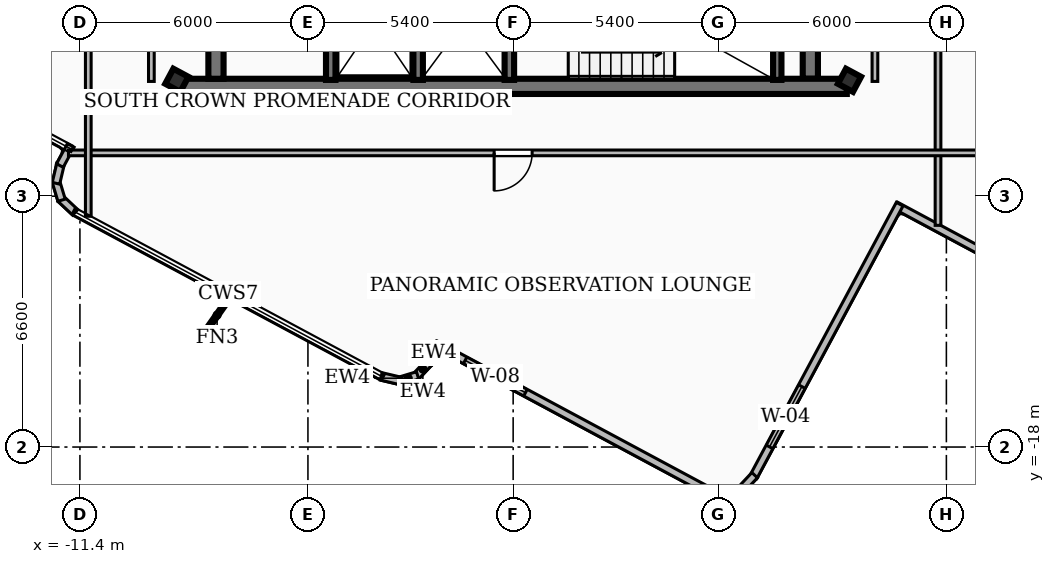
"""IFC4 building model, lengths in metres.
Left out: names, types, materials, properties, quantities, classifications, styles, units other than length and angle.
Written with IfcOpenShell. Run it as: python <this file> out.ifc"""

import sys

from ifc_helpers import new_model, si_unit, direction, frame, frame_2d, origin, origin_2d, place, context, subcontext, project, spatial, rectangle, hollow_rectangle, extrude, element, fill, save


model = new_model("IFC4")
c1 = context("Model", 3, precision=1e-05, world=origin(), true_north=direction((0.0, 1.0)))
c2 = subcontext(c1, "Body", "Model", "MODEL_VIEW")
j1 = project(units=[si_unit("LENGTHUNIT", "METRE"), si_unit("PLANEANGLEUNIT", "RADIAN")], contexts=[c1])
p1 = place(None, origin())
s1 = spatial("IfcSite", under=j1, at=p1, CompositionType="ELEMENT")
p2 = place(p1, origin())
s2 = spatial("IfcBuilding", under=s1, at=p2, CompositionType="ELEMENT")
p3 = place(p2, frame((0.0, 0.0, 285.12)))
s3 = spatial("IfcBuildingStorey", under=s2, at=p3, CompositionType="ELEMENT", Elevation=285.12)
p4 = place(p3, frame((8.78, -8.51, 0.0), z_axis=(0.0, 0.0, 1.0), x_axis=(-1.0, 0.0, 0.0)))
e1 = element("IfcWall", 1, at=p4, inside=s3, PredefinedType="SHEAR", context=c2, shape_type="SweptSolid", body=[
    extrude(rectangle(XDim=17.56, YDim=0.4, at=frame_2d((8.78, 0.0))), origin(), (0.0, 0.0, 1.0), 3.84),
])
for number, where, z_axis, x_axis in (
    (2, (-7.82, -8.31, 0.0), (0.0, 0.0, 1.0), (0.0, 1.0, 0.0)),
    (3, (7.82, -1.95, 0.0), (0.0, 0.0, 1.0), (0.0, -1.0, 0.0)),
):
    element("IfcWall", number, at=place(p3, frame(where, z_axis=z_axis, x_axis=x_axis)), inside=s3, PredefinedType="SHEAR", context=c2, shape_type="SweptSolid", body=[
        extrude(rectangle(XDim=6.36, YDim=0.4, at=frame_2d((3.18, 0.0))), origin(), (0.0, 0.0, 1.0), 3.84),
    ])
p5 = place(p3, frame((6.95, -8.34, 0.0), z_axis=(0.0, 0.0, 1.0), x_axis=(0.0, 1.0, 0.0)))
e4 = element("IfcWall", 4, at=p5, inside=s3, PredefinedType="SOLIDWALL", context=c2, shape_type="SweptSolid", body=[
    extrude(rectangle(XDim=3.06, YDim=0.22, at=frame_2d((1.53, 0.0))), origin(), (0.0, 0.0, 1.0), 3.84),
])
for number, where, z_axis, x_axis in (
    (5, (-0.1, -8.34, 0.0), (0.0, 0.0, 1.0), (0.0, 1.0, 0.0)),
    (6, (-2.5, -8.34, 0.0), (0.0, 0.0, 1.0), (0.0, 1.0, 0.0)),
    (7, (-4.8, -8.34, 0.0), (0.0, 0.0, 1.0), (0.0, 1.0, 0.0)),
):
    element("IfcWall", number, at=place(p3, frame(where, z_axis=z_axis, x_axis=x_axis)), inside=s3, PredefinedType="SOLIDWALL", context=c2, shape_type="SweptSolid", body=[
        extrude(rectangle(XDim=3.04, YDim=0.25, at=frame_2d((1.52, 0.0))), origin(), (0.0, 0.0, 1.0), 3.84),
    ])
for number, where, z_axis, x_axis in (
    (8, (8.85, -8.35, 0.0), (0.0, 0.0, 1.0), (0.473, 0.881, 0.0)),
    (9, (-8.85, -8.35, 0.0), (0.0, 0.0, 1.0), (0.473, 0.881, 0.0)),
):
    element("IfcColumn", number, at=place(p3, frame(where, z_axis=z_axis, x_axis=x_axis)), inside=s3, PredefinedType="COLUMN", context=c2, shape_type="SweptSolid", body=[
        extrude(hollow_rectangle(XDim=0.45, YDim=0.45, WallThickness=0.022, at=origin_2d()), origin(), (0.0, 0.0, 1.0), 4.14),
    ])
p6 = place(p3, frame((-1.938, -15.266, 0.0), z_axis=(0.0, 0.0, 1.0), x_axis=(-0.475211699331, -0.879871491082, 0.0)))
e10 = element("IfcWall", 10, at=p6, inside=s3, PredefinedType="SOLIDWALL", context=c2, shape_type="SweptSolid", body=[
    extrude(rectangle(XDim=0.602, YDim=0.2, at=frame_2d((0.301, 0.0))), origin(), (0.0, 0.0, 1.0), 3.84),
])
p7 = place(p3, frame((-2.195, -15.756, 0.0), z_axis=(0.0, 0.0, 1.0), x_axis=(-0.684988740216, -0.728553653328, 0.0)))
e11 = element("IfcWall", 11, at=p7, inside=s3, PredefinedType="SOLIDWALL", context=c2, shape_type="SweptSolid", body=[
    extrude(rectangle(XDim=0.527, YDim=0.2, at=frame_2d((0.263, 0.0))), origin(), (0.0, 0.0, 1.0), 3.84),
])
p8 = place(p3, frame((-2.515, -16.115, 0.0), z_axis=(0.0, 0.0, 1.0), x_axis=(-0.95766925037, -0.287870816332, 0.0)))
e12 = element("IfcWall", 12, at=p8, inside=s3, PredefinedType="SOLIDWALL", context=c2, shape_type="SweptSolid", body=[
    extrude(rectangle(XDim=0.514, YDim=0.2, at=frame_2d((0.257, 0.0))), origin(), (0.0, 0.0, 1.0), 3.84),
])
p9 = place(p3, frame((-2.959, -16.262, 0.0), z_axis=(0.0, 0.0, 1.0), x_axis=(-0.973350293123, 0.22932336749, 0.0)))
e13 = element("IfcWall", 13, at=p9, inside=s3, PredefinedType="SOLIDWALL", context=c2, shape_type="SweptSolid", body=[
    extrude(rectangle(XDim=0.527, YDim=0.2, at=frame_2d((0.264, 0.0))), origin(), (0.0, 0.0, 1.0), 3.84),
])
p10 = place(p3, frame((-11.523, -11.825, 0.0), z_axis=(0.0, 0.0, 1.0), x_axis=(-0.729638195887, 0.683833388409, 0.0)))
e14 = element("IfcWall", 14, at=p10, inside=s3, PredefinedType="SOLIDWALL", context=c2, shape_type="SweptSolid", body=[
    extrude(rectangle(XDim=0.528, YDim=0.2, at=frame_2d((0.264, 0.0))), origin(), (0.0, 0.0, 1.0), 3.84),
])
p11 = place(p3, frame((-11.883, -11.505, 0.0), z_axis=(0.0, 0.0, 1.0), x_axis=(-0.287478448092, 0.957787106763, 0.0)))
e15 = element("IfcWall", 15, at=p11, inside=s3, PredefinedType="SOLIDWALL", context=c2, shape_type="SweptSolid", body=[
    extrude(rectangle(XDim=0.515, YDim=0.2, at=frame_2d((0.257, 0.0))), origin(), (0.0, 0.0, 1.0), 3.84),
])
p12 = place(p3, frame((-12.03, -11.06, 0.0), z_axis=(0.0, 0.0, 1.0), x_axis=(0.229762213536, 0.973246795644, 0.0)))
e16 = element("IfcWall", 16, at=p12, inside=s3, PredefinedType="SOLIDWALL", context=c2, shape_type="SweptSolid", body=[
    extrude(rectangle(XDim=0.527, YDim=0.2, at=frame_2d((0.264, 0.0))), origin(), (0.0, 0.0, 1.0), 3.84),
])
p13 = place(p3, frame((-11.927, -10.593, 0.0), z_axis=(0.0, 0.0, 1.0), x_axis=(0.474728264628, 0.88013241888, 0.0)))
e17 = element("IfcWall", 17, at=p13, inside=s3, PredefinedType="SOLIDWALL", context=c2, shape_type="SweptSolid", body=[
    extrude(rectangle(XDim=0.602, YDim=0.2, at=frame_2d((0.301, 0.0))), origin(), (0.0, 0.0, 1.0), 3.84),
])
p14 = place(p3, frame((12.268, -12.825, 0.0), z_axis=(0.0, 0.0, 1.0), x_axis=(-0.881305917183, 0.472546167414, 0.0)))
e18 = element("IfcWall", 18, at=p14, inside=s3, PredefinedType="SOLIDWALL", context=c2, shape_type="SweptSolid", body=[
    extrude(rectangle(XDim=2.503, YDim=0.2, at=frame_2d((1.251, 0.0))), origin(), (0.0, 0.0, 1.0), 3.84),
])
p15 = place(p3, frame((10.171, -11.609, 0.0), z_axis=(0.0, 0.0, 1.0), x_axis=(-0.472535281242, -0.881311754138, 0.0)))
e19 = element("IfcWall", 19, at=p15, inside=s3, PredefinedType="SOLIDWALL", context=c2, shape_type="SweptSolid", body=[
    extrude(rectangle(XDim=8.137, YDim=0.2, at=frame_2d((4.068, 0.0))), origin(), (0.0, 0.0, 1.0), 3.84),
])
p16 = place(p15, frame((5.447, 0.0, 0.85)))
e20 = element("IfcOpeningElement", 20, at=p16, cuts=e19, PredefinedType="OPENING", context=c2, shape_type="SweptSolid", body=[
    extrude(rectangle(XDim=1.8, YDim=2.0, at=frame_2d((0.9, 1.0))), frame((0.0, 0.11, 0.0), z_axis=(0.0, -1.0, 0.0), x_axis=(1.0, 0.0, 0.0)), (0.0, 0.0, 1.0), 0.22),
])
p17 = place(p3, frame((6.355, -18.74, 0.0), z_axis=(0.0, 0.0, 1.0), x_axis=(-0.684079586619, -0.72940737532, 0.0)))
e21 = element("IfcWall", 21, at=p17, inside=s3, PredefinedType="SOLIDWALL", context=c2, shape_type="SweptSolid", body=[
    extrude(rectangle(XDim=0.528, YDim=0.2, at=frame_2d((0.264, 0.0))), origin(), (0.0, 0.0, 1.0), 3.84),
])
p18 = place(p3, frame((5.124, -19.144, 0.0), z_axis=(0.0, 0.0, 1.0), x_axis=(-0.881261771031, 0.472628491439, 0.0)))
e22 = element("IfcWall", 22, at=p18, inside=s3, PredefinedType="SOLIDWALL", context=c2, shape_type="SweptSolid", body=[
    extrude(rectangle(XDim=8.137, YDim=0.2, at=frame_2d((4.069, 0.0))), origin(), (0.0, 0.0, 1.0), 3.84),
])
p19 = place(p18, frame((5.447, 0.0, 0.85)))
e23 = element("IfcOpeningElement", 23, at=p19, cuts=e22, PredefinedType="OPENING", context=c2, shape_type="SweptSolid", body=[
    extrude(rectangle(XDim=1.8, YDim=1.8, at=frame_2d((0.9, 0.9))), frame((0.0, 0.11, 0.0), z_axis=(0.0, -1.0, 0.0), x_axis=(1.0, 0.0, 0.0)), (0.0, 0.0, 1.0), 0.22),
])
p20 = place(p3, frame((-9.52, -8.38, 0.0), z_axis=(0.0, 0.0, 1.0), x_axis=(0.0, 1.0, 0.0)))
e24 = element("IfcWall", 24, at=p20, inside=s3, PredefinedType="PARTITIONING", context=c2, shape_type="SweptSolid", body=[
    extrude(rectangle(XDim=6.63, YDim=0.15, at=frame_2d((3.315, 0.0))), origin(), (0.0, 0.0, 1.0), 3.84),
])
p21 = place(p3, frame((9.52, -8.38, 0.0), z_axis=(0.0, 0.0, 1.0), x_axis=(0.0, 1.0, 0.0)))
e25 = element("IfcWall", 25, at=p21, inside=s3, PredefinedType="PARTITIONING", context=c2, shape_type="SweptSolid", body=[
    extrude(rectangle(XDim=6.63, YDim=0.15, at=frame_2d((3.315, 0.0))), origin(), (0.0, 0.0, 1.0), 3.21),
])
p22 = place(p3, frame((11.18, 18.1, 0.0), z_axis=(0.0, 0.0, 1.0), x_axis=(0.0, -1.0, 0.0)))
e26 = element("IfcWall", 26, at=p22, inside=s3, PredefinedType="PARTITIONING", context=c2, shape_type="SweptSolid", body=[
    extrude(rectangle(XDim=30.267, YDim=0.15, at=frame_2d((15.134, 0.0))), origin(), (0.0, 0.0, 1.0), 3.84),
])
p23 = place(p22, frame((17.6, 0.0, 0.0)))
e27 = element("IfcOpeningElement", 27, at=p23, cuts=e26, PredefinedType="OPENING", context=c2, shape_type="SweptSolid", body=[
    extrude(rectangle(XDim=1.0, YDim=2.1, at=frame_2d((0.5, 1.05))), frame((0.0, 0.085, 0.0), z_axis=(0.0, -1.0, 0.0), x_axis=(1.0, 0.0, 0.0)), (0.0, 0.0, 1.0), 0.17),
])
p24 = place(p3, frame((-11.18, -11.928, 0.0), z_axis=(0.0, 0.0, 1.0), x_axis=(0.0, 1.0, 0.0)))
e28 = element("IfcWall", 28, at=p24, inside=s3, PredefinedType="PARTITIONING", context=c2, shape_type="SweptSolid", body=[
    extrude(rectangle(XDim=24.095, YDim=0.15, at=frame_2d((12.047, 0.0))), origin(), (0.0, 0.0, 1.0), 3.84),
])
p25 = place(p24, frame((9.828, 0.0, 0.0)))
e29 = element("IfcOpeningElement", 29, at=p25, cuts=e28, PredefinedType="OPENING", context=c2, shape_type="SweptSolid", body=[
    extrude(rectangle(XDim=1.0, YDim=2.1, at=frame_2d((0.5, 1.05))), frame((0.0, 0.085, 0.0), z_axis=(0.0, -1.0, 0.0), x_axis=(1.0, 0.0, 0.0)), (0.0, 0.0, 1.0), 0.17),
])
p26 = place(p3, frame((14.577, -10.26, 0.0), z_axis=(0.0, 0.0, 1.0), x_axis=(-1.0, 0.0, 0.0)))
e30 = element("IfcWall", 30, at=p26, inside=s3, PredefinedType="PARTITIONING", context=c2, shape_type="SweptSolid", body=[
    extrude(rectangle(XDim=26.278, YDim=0.15, at=frame_2d((13.139, 0.0))), origin(), (0.0, 0.0, 1.0), 3.84),
])
p27 = place(p26, frame((14.077, 0.0, 0.0)))
e31 = element("IfcOpeningElement", 31, at=p27, cuts=e30, PredefinedType="OPENING", context=c2, shape_type="SweptSolid", body=[
    extrude(rectangle(XDim=1.0, YDim=2.1, at=frame_2d((0.5, 1.05))), frame((0.0, 0.085, 0.0), z_axis=(0.0, -1.0, 0.0), x_axis=(1.0, 0.0, 0.0)), (0.0, 0.0, 1.0), 0.17),
])
p28 = place(p16, origin())
e32 = element("IfcWindow", 32, at=p28, inside=s3, PartitioningType="SINGLE_PANEL", PredefinedType="WINDOW", context=c2, shape_type="SweptSolid", body=[
    extrude(rectangle(XDim=1.8, YDim=2.0, at=frame_2d((0.9, 1.0))), frame((0.0, 0.03, 0.0), z_axis=(0.0, -1.0, 0.0), x_axis=(1.0, 0.0, 0.0)), (0.0, 0.0, 1.0), 0.06),
])
fill(e20, e32)
p29 = place(p19, origin())
e33 = element("IfcWindow", 33, at=p29, inside=s3, PartitioningType="SINGLE_PANEL", PredefinedType="WINDOW", context=c2, shape_type="SweptSolid", body=[
    extrude(rectangle(XDim=1.8, YDim=1.8, at=frame_2d((0.9, 0.9))), frame((0.0, 0.03, 0.0), z_axis=(0.0, -1.0, 0.0), x_axis=(1.0, 0.0, 0.0)), (0.0, 0.0, 1.0), 0.06),
])
fill(e23, e33)
p30 = place(p27, origin())
e34 = element("IfcDoor", 34, at=p30, inside=s3, OperationType="SINGLE_SWING_RIGHT", PredefinedType="DOOR", context=c2, shape_type="SweptSolid", body=[
    extrude(rectangle(XDim=1.0, YDim=2.1, at=frame_2d((0.5, 1.05))), frame((0.0, 0.025, 0.0), z_axis=(0.0, -1.0, 0.0), x_axis=(1.0, 0.0, 0.0)), (0.0, 0.0, 1.0), 0.05),
])
fill(e31, e34)
save(model, sys.argv[1])
